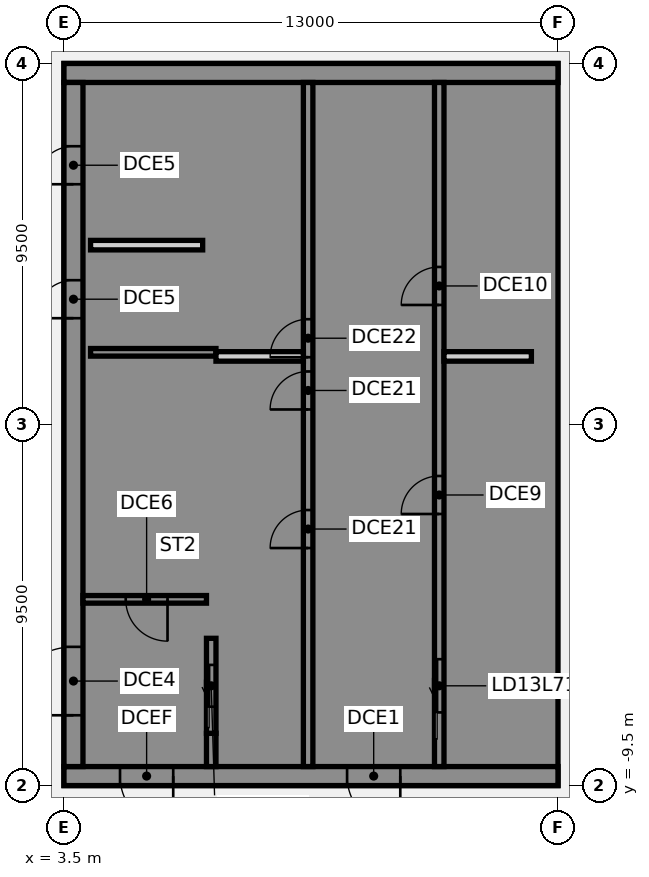
"""IFC4 building model, lengths in metres.
Left out: names, types, materials, properties, quantities, classifications, styles, units other than length and angle.
Written with IfcOpenShell. Run it as: python <this file> out.ifc"""

import sys

from ifc_helpers import new_model, si_unit, direction, frame, frame_2d, origin, place, context, subcontext, project, spatial, polyline, rectangle, outline, extrude, element, fill, save


model = new_model("IFC4")
c1 = context("Model", 3, precision=1e-05, world=origin(), true_north=direction((0.0, 1.0)))
c2 = subcontext(c1, "Body", "Model", "MODEL_VIEW")
j1 = project(units=[si_unit("LENGTHUNIT", "METRE"), si_unit("PLANEANGLEUNIT", "RADIAN")], contexts=[c1])
p1 = place(None, origin())
s1 = spatial("IfcSite", under=j1, at=p1, CompositionType="ELEMENT")
p2 = place(p1, origin())
s2 = spatial("IfcBuilding", under=s1, at=p2, CompositionType="ELEMENT")
p3 = place(p2, frame((0.0, 0.0, 278.4)))
s3 = spatial("IfcBuildingStorey", under=s2, at=p3, CompositionType="ELEMENT", Elevation=278.4)
p4 = place(p3, frame((16.5, -9.25, 0.0), z_axis=(0.0, 0.0, 1.0), x_axis=(-1.0, 0.0, 0.0)))
e1 = element("IfcWall", 1, at=p4, inside=s3, PredefinedType="SHEAR", context=c2, shape_type="SweptSolid", body=[
    extrude(rectangle(XDim=13.0, YDim=0.5, at=frame_2d((6.5, 0.0))), origin(), (0.0, 0.0, 1.0), 8.8),
])
p5 = place(p4, frame((4.15, 0.0, 0.0)))
e2 = element("IfcOpeningElement", 2, at=p5, cuts=e1, PredefinedType="OPENING", context=c2, shape_type="SweptSolid", body=[
    extrude(rectangle(XDim=1.4, YDim=2.1, at=frame_2d((0.7, 1.05))), frame((0.0, 0.26, 0.0), z_axis=(0.0, -1.0, 0.0), x_axis=(1.0, 0.0, 0.0)), (0.0, 0.0, 1.0), 0.52),
])
p6 = place(p4, frame((10.125, 0.0, 0.0)))
e3 = element("IfcOpeningElement", 3, at=p6, cuts=e1, PredefinedType="OPENING", context=c2, shape_type="SweptSolid", body=[
    extrude(rectangle(XDim=1.4, YDim=2.1, at=frame_2d((0.7, 1.05))), frame((0.0, 0.26, 0.0), z_axis=(0.0, -1.0, 0.0), x_axis=(1.0, 0.0, 0.0)), (0.0, 0.0, 1.0), 0.52),
])
p7 = place(p3, origin())
e4 = element("IfcWall", 4, at=p7, inside=s3, PredefinedType="SHEAR", context=c2, shape_type="SweptSolid", body=[
    extrude(outline(polyline([(13.5, -8.125), (13.5, -9.0), (16.0, -9.0), (16.5, -9.0), (16.5, 9.0), (16.0, 9.0), (13.5, 9.0), (13.5, 8.125), (16.0, 8.125), (16.0, 5.625), (13.5, 5.625), (13.5, 5.375), (16.0, 5.375), (16.0, -5.375), (13.5, -5.375), (13.5, -5.625), (16.0, -5.625), (16.0, -8.125), (13.5, -8.125)])), origin(), (0.0, 0.0, 1.0), 8.8),
])
p8 = place(p3, frame((16.5, 9.25, 0.0), z_axis=(0.0, 0.0, 1.0), x_axis=(-1.0, 0.0, 0.0)))
e5 = element("IfcWall", 5, at=p8, inside=s3, PredefinedType="SHEAR", context=c2, shape_type="SweptSolid", body=[
    extrude(rectangle(XDim=13.0, YDim=0.5, at=frame_2d((6.5, 0.0))), origin(), (0.0, 0.0, 1.0), 8.8),
])
p9 = place(p3, origin())
e6 = element("IfcWall", 6, at=p9, inside=s3, PredefinedType="SHEAR", context=c2, shape_type="SweptSolid", body=[
    extrude(outline(polyline([(9.8, -5.375), (7.5, -5.375), (7.5, 2.625), (9.8, 2.625), (9.8, 2.875), (7.5, 2.875), (7.5, 5.375), (9.8, 5.375), (9.8, 5.625), (7.5, 5.625), (7.5, 8.125), (9.8, 8.125), (9.8, 9.0), (7.5, 9.0), (7.25, 9.0), (7.25, -5.625), (7.5, -5.625), (9.8, -5.625), (9.8, -5.375)])), origin(), (0.0, 0.0, 1.0), 8.8),
])
p10 = place(p3, origin())
e7 = element("IfcWall", 7, at=p10, inside=s3, PredefinedType="SHEAR", context=c2, shape_type="SweptSolid", body=[
    extrude(outline(polyline([(7.5, -8.125), (7.5, -9.0), (9.8, -9.0), (9.8, -8.125), (9.8, -5.625), (9.55, -5.625), (9.55, -8.125), (7.5, -8.125)])), origin(), (0.0, 0.0, 1.0), 8.8),
])
p11 = place(p3, frame((7.375, -9.0, 0.0), z_axis=(0.0, 0.0, 1.0), x_axis=(0.0, 1.0, 0.0)))
e8 = element("IfcWall", 8, at=p11, inside=s3, PredefinedType="SHEAR", context=c2, shape_type="SweptSolid", body=[
    extrude(rectangle(XDim=0.875, YDim=0.25, at=frame_2d((0.438, 0.0))), origin(), (0.0, 0.0, 1.0), 8.8),
])
p12 = place(p3, frame((7.5, 1.9, 0.0), z_axis=(0.0, 0.0, 1.0), x_axis=(-1.0, 0.0, 0.0)))
e9 = element("IfcWall", 9, at=p12, inside=s3, PredefinedType="SHEAR", context=c2, shape_type="SweptSolid", body=[
    extrude(rectangle(XDim=3.3, YDim=0.2, at=frame_2d((1.65, 0.0))), origin(), (0.0, 0.0, 1.0), 8.8),
])
p13 = place(p3, frame((13.375, -9.0, 0.0), z_axis=(0.0, 0.0, 1.0), x_axis=(0.0, 1.0, 0.0)))
e10 = element("IfcWall", 10, at=p13, inside=s3, PredefinedType="SHEAR", context=c2, shape_type="SweptSolid", body=[
    extrude(rectangle(XDim=18.0, YDim=0.25, at=frame_2d((9.0, 0.0))), origin(), (0.0, 0.0, 1.0), 8.8),
])
p14 = place(p13, frame((1.425, 0.0, 0.0)))
e11 = element("IfcOpeningElement", 11, at=p14, cuts=e10, PredefinedType="OPENING", context=c2, shape_type="SweptSolid", body=[
    extrude(rectangle(XDim=1.4, YDim=2.1, at=frame_2d((0.7, 1.05))), frame((0.0, 0.135, 0.0), z_axis=(0.0, -1.0, 0.0), x_axis=(1.0, 0.0, 0.0)), (0.0, 0.0, 1.0), 0.27),
])
p15 = place(p13, frame((6.646, 0.0, 0.0)))
e12 = element("IfcOpeningElement", 12, at=p15, cuts=e10, PredefinedType="OPENING", context=c2, shape_type="SweptSolid", body=[
    extrude(rectangle(XDim=1.0, YDim=2.1, at=frame_2d((0.5, 1.05))), frame((0.0, 0.135, 0.0), z_axis=(0.0, -1.0, 0.0), x_axis=(1.0, 0.0, 0.0)), (0.0, 0.0, 1.0), 0.27),
])
p16 = place(p13, frame((12.146, 0.0, 0.0)))
e13 = element("IfcOpeningElement", 13, at=p16, cuts=e10, PredefinedType="OPENING", context=c2, shape_type="SweptSolid", body=[
    extrude(rectangle(XDim=1.0, YDim=2.1, at=frame_2d((0.5, 1.05))), frame((0.0, 0.135, 0.0), z_axis=(0.0, -1.0, 0.0), x_axis=(1.0, 0.0, 0.0)), (0.0, 0.0, 1.0), 0.27),
])
p17 = place(p3, frame((9.925, -9.0, 0.0), z_axis=(0.0, 0.0, 1.0), x_axis=(0.0, 1.0, 0.0)))
e14 = element("IfcWall", 14, at=p17, inside=s3, PredefinedType="SHEAR", context=c2, shape_type="SweptSolid", body=[
    extrude(rectangle(XDim=18.0, YDim=0.25, at=frame_2d((9.0, 0.0))), origin(), (0.0, 0.0, 1.0), 8.8),
])
p18 = place(p17, frame((5.75, 0.0, 0.0)))
e15 = element("IfcOpeningElement", 15, at=p18, cuts=e14, PredefinedType="OPENING", context=c2, shape_type="SweptSolid", body=[
    extrude(rectangle(XDim=1.0, YDim=2.1, at=frame_2d((0.5, 1.05))), frame((0.0, 0.135, 0.0), z_axis=(0.0, -1.0, 0.0), x_axis=(1.0, 0.0, 0.0)), (0.0, 0.0, 1.0), 0.27),
])
p19 = place(p17, frame((9.396, 0.0, 0.0)))
e16 = element("IfcOpeningElement", 16, at=p19, cuts=e14, PredefinedType="OPENING", context=c2, shape_type="SweptSolid", body=[
    extrude(rectangle(XDim=1.0, YDim=2.1, at=frame_2d((0.5, 1.05))), frame((0.0, 0.135, 0.0), z_axis=(0.0, -1.0, 0.0), x_axis=(1.0, 0.0, 0.0)), (0.0, 0.0, 1.0), 0.27),
])
p20 = place(p17, frame((10.771, 0.0, 0.0)))
e17 = element("IfcOpeningElement", 17, at=p20, cuts=e14, PredefinedType="OPENING", context=c2, shape_type="SweptSolid", body=[
    extrude(rectangle(XDim=1.0, YDim=2.1, at=frame_2d((0.5, 1.05))), frame((0.0, 0.135, 0.0), z_axis=(0.0, -1.0, 0.0), x_axis=(1.0, 0.0, 0.0)), (0.0, 0.0, 1.0), 0.27),
])
p21 = place(p3, frame((7.375, -8.125, 0.0), z_axis=(0.0, 0.0, 1.0), x_axis=(0.0, 1.0, 0.0)))
e18 = element("IfcWall", 18, at=p21, inside=s3, PredefinedType="SHEAR", context=c2, shape_type="SweptSolid", body=[
    extrude(rectangle(XDim=2.5, YDim=0.25, at=frame_2d((1.25, 0.0))), origin(), (0.0, 0.0, 1.0), 8.8),
])
p22 = place(p21, frame((0.7, 0.0, 0.0)))
e19 = element("IfcOpeningElement", 19, at=p22, cuts=e18, PredefinedType="OPENING", context=c2, shape_type="SweptSolid", body=[
    extrude(rectangle(XDim=1.1, YDim=2.1, at=frame_2d((0.55, 1.05))), frame((0.0, 0.135, 0.0), z_axis=(0.0, -1.0, 0.0), x_axis=(1.0, 0.0, 0.0)), (0.0, 0.0, 1.0), 0.27),
])
p23 = place(p3, frame((3.75, -9.0, 0.0), z_axis=(0.0, 0.0, 1.0), x_axis=(0.0, 1.0, 0.0)))
e20 = element("IfcWall", 20, at=p23, inside=s3, PredefinedType="SHEAR", context=c2, shape_type="SweptSolid", body=[
    extrude(rectangle(XDim=18.0, YDim=0.5, at=frame_2d((9.0, 0.0))), origin(), (0.0, 0.0, 1.0), 8.8),
])
p24 = place(p23, frame((1.35, 0.0, 0.0)))
e21 = element("IfcOpeningElement", 21, at=p24, cuts=e20, PredefinedType="OPENING", context=c2, shape_type="SweptSolid", body=[
    extrude(rectangle(XDim=1.8, YDim=2.1, at=frame_2d((0.9, 1.05))), frame((0.0, 0.26, 0.0), z_axis=(0.0, -1.0, 0.0), x_axis=(1.0, 0.0, 0.0)), (0.0, 0.0, 1.0), 0.52),
])
p25 = place(p23, frame((11.798, 0.0, 0.0)))
e22 = element("IfcOpeningElement", 22, at=p25, cuts=e20, PredefinedType="OPENING", context=c2, shape_type="SweptSolid", body=[
    extrude(rectangle(XDim=1.0, YDim=2.1, at=frame_2d((0.5, 1.05))), frame((0.0, 0.26, 0.0), z_axis=(0.0, -1.0, 0.0), x_axis=(1.0, 0.0, 0.0)), (0.0, 0.0, 1.0), 0.52),
])
p26 = place(p23, frame((15.323, 0.0, 0.0)))
e23 = element("IfcOpeningElement", 23, at=p26, cuts=e20, PredefinedType="OPENING", context=c2, shape_type="SweptSolid", body=[
    extrude(rectangle(XDim=1.0, YDim=2.1, at=frame_2d((0.5, 1.05))), frame((0.0, 0.26, 0.0), z_axis=(0.0, -1.0, 0.0), x_axis=(1.0, 0.0, 0.0)), (0.0, 0.0, 1.0), 0.52),
])
p27 = place(p3, frame((7.15, 4.72, 0.0), z_axis=(0.0, 0.0, 1.0), x_axis=(-1.0, 0.0, 0.0)))
e24 = element("IfcWall", 24, at=p27, inside=s3, PredefinedType="PARTITIONING", context=c2, shape_type="SweptSolid", body=[
    extrude(rectangle(XDim=2.95, YDim=0.25, at=frame_2d((1.475, 0.0))), origin(), (0.0, 0.0, 1.0), 8.8),
])
p28 = place(p3, frame((7.25, -4.6, 0.0), z_axis=(0.0, 0.0, 1.0), x_axis=(-1.0, 0.0, 0.0)))
e25 = element("IfcWall", 25, at=p28, inside=s3, PredefinedType="SHEAR", context=c2, shape_type="SweptSolid", body=[
    extrude(rectangle(XDim=3.25, YDim=0.2, at=frame_2d((1.625, 0.0))), origin(), (0.0, 0.0, 1.0), 8.8),
])
p29 = place(p28, frame((1.025, 0.0, 0.0)))
e26 = element("IfcOpeningElement", 26, at=p29, cuts=e25, PredefinedType="OPENING", context=c2, shape_type="SweptSolid", body=[
    extrude(rectangle(XDim=1.1, YDim=2.1, at=frame_2d((0.55, 1.05))), frame((0.0, 0.11, 0.0), z_axis=(0.0, -1.0, 0.0), x_axis=(1.0, 0.0, 0.0)), (0.0, 0.0, 1.0), 0.22),
])
for number, where, z_axis, x_axis in (
    (27, (15.8, 1.792, 0.0), (0.0, 0.0, 1.0), (-1.0, 0.0, 0.0)),
    (28, (9.8, 1.792, 0.0), (0.0, 0.0, 1.0), (-1.0, 0.0, 0.0)),
):
    element("IfcWall", number, at=place(p3, frame(where, z_axis=z_axis, x_axis=x_axis)), inside=s3, PredefinedType="PARTITIONING", context=c2, shape_type="SweptSolid", body=[
        extrude(rectangle(XDim=2.3, YDim=0.25, at=frame_2d((1.15, 0.0))), origin(), (0.0, 0.0, 1.0), 8.8),
    ])
p30 = place(p5, origin())
e29 = element("IfcDoor", 29, at=p30, inside=s3, OperationType="SINGLE_SWING_LEFT", PredefinedType="DOOR", context=c2, shape_type="SweptSolid", body=[
    extrude(rectangle(XDim=1.4, YDim=2.1, at=frame_2d((0.7, 1.05))), frame((0.0, 0.025, 0.0), z_axis=(0.0, -1.0, 0.0), x_axis=(1.0, 0.0, 0.0)), (0.0, 0.0, 1.0), 0.05),
])
fill(e2, e29)
p31 = place(p6, origin())
e30 = element("IfcDoor", 30, at=p31, inside=s3, OperationType="SINGLE_SWING_LEFT", PredefinedType="DOOR", context=c2, shape_type="SweptSolid", body=[
    extrude(rectangle(XDim=1.4, YDim=2.1, at=frame_2d((0.7, 1.05))), frame((0.0, 0.025, 0.0), z_axis=(0.0, -1.0, 0.0), x_axis=(1.0, 0.0, 0.0)), (0.0, 0.0, 1.0), 0.05),
])
fill(e3, e30)
p32 = place(p24, origin())
e31 = element("IfcDoor", 31, at=p32, inside=s3, OperationType="SINGLE_SWING_LEFT", PredefinedType="DOOR", context=c2, shape_type="SweptSolid", body=[
    extrude(rectangle(XDim=1.8, YDim=2.1, at=frame_2d((0.9, 1.05))), frame((0.0, 0.025, 0.0), z_axis=(0.0, -1.0, 0.0), x_axis=(1.0, 0.0, 0.0)), (0.0, 0.0, 1.0), 0.05),
])
fill(e21, e31)
p33 = place(p25, origin())
e32 = element("IfcDoor", 32, at=p33, inside=s3, OperationType="SINGLE_SWING_LEFT", PredefinedType="DOOR", context=c2, shape_type="SweptSolid", body=[
    extrude(rectangle(XDim=1.0, YDim=2.1, at=frame_2d((0.5, 1.05))), frame((0.0, -0.175, 0.0), z_axis=(0.0, -1.0, 0.0), x_axis=(1.0, 0.0, 0.0)), (0.0, 0.0, 1.0), 0.05),
])
fill(e22, e32)
p34 = place(p26, origin())
e33 = element("IfcDoor", 33, at=p34, inside=s3, OperationType="SINGLE_SWING_LEFT", PredefinedType="DOOR", context=c2, shape_type="SweptSolid", body=[
    extrude(rectangle(XDim=1.0, YDim=2.1, at=frame_2d((0.5, 1.05))), frame((0.0, -0.175, 0.0), z_axis=(0.0, -1.0, 0.0), x_axis=(1.0, 0.0, 0.0)), (0.0, 0.0, 1.0), 0.05),
])
fill(e23, e33)
p35 = place(p29, origin())
e34 = element("IfcDoor", 34, at=p35, inside=s3, OperationType="SINGLE_SWING_LEFT", PredefinedType="DOOR", context=c2, shape_type="SweptSolid", body=[
    extrude(rectangle(XDim=1.1, YDim=2.1, at=frame_2d((0.55, 1.05))), frame((0.0, 0.025, 0.0), z_axis=(0.0, -1.0, 0.0), x_axis=(1.0, 0.0, 0.0)), (0.0, 0.0, 1.0), 0.05),
])
fill(e26, e34)
p36 = place(p14, origin())
e35 = element("IfcDoor", 35, at=p36, inside=s3, OperationType="SLIDING_TO_LEFT", PredefinedType="DOOR", context=c2, shape_type="SweptSolid", body=[
    extrude(rectangle(XDim=1.4, YDim=2.1, at=frame_2d((0.7, 1.05))), frame((0.0, 0.025, 0.0), z_axis=(0.0, -1.0, 0.0), x_axis=(1.0, 0.0, 0.0)), (0.0, 0.0, 1.0), 0.05),
])
fill(e11, e35)
p37 = place(p22, origin())
e36 = element("IfcDoor", 36, at=p37, inside=s3, OperationType="SLIDING_TO_LEFT", PredefinedType="DOOR", context=c2, shape_type="SweptSolid", body=[
    extrude(rectangle(XDim=1.1, YDim=2.1, at=frame_2d((0.55, 1.05))), frame((0.0, 0.025, 0.0), z_axis=(0.0, -1.0, 0.0), x_axis=(1.0, 0.0, 0.0)), (0.0, 0.0, 1.0), 0.05),
])
fill(e19, e36)
p38 = place(p15, origin())
e37 = element("IfcDoor", 37, at=p38, inside=s3, OperationType="SINGLE_SWING_LEFT", PredefinedType="DOOR", context=c2, shape_type="SweptSolid", body=[
    extrude(rectangle(XDim=1.0, YDim=2.1, at=frame_2d((0.5, 1.05))), frame((0.0, 0.025, 0.0), z_axis=(0.0, -1.0, 0.0), x_axis=(1.0, 0.0, 0.0)), (0.0, 0.0, 1.0), 0.05),
])
fill(e12, e37)
p39 = place(p16, origin())
e38 = element("IfcDoor", 38, at=p39, inside=s3, OperationType="SINGLE_SWING_LEFT", PredefinedType="DOOR", context=c2, shape_type="SweptSolid", body=[
    extrude(rectangle(XDim=1.0, YDim=2.1, at=frame_2d((0.5, 1.05))), frame((0.0, 0.025, 0.0), z_axis=(0.0, -1.0, 0.0), x_axis=(1.0, 0.0, 0.0)), (0.0, 0.0, 1.0), 0.05),
])
fill(e13, e38)
p40 = place(p18, origin())
e39 = element("IfcDoor", 39, at=p40, inside=s3, OperationType="SINGLE_SWING_LEFT", PredefinedType="DOOR", context=c2, shape_type="SweptSolid", body=[
    extrude(rectangle(XDim=1.0, YDim=2.1, at=frame_2d((0.5, 1.05))), frame((0.0, 0.025, 0.0), z_axis=(0.0, -1.0, 0.0), x_axis=(1.0, 0.0, 0.0)), (0.0, 0.0, 1.0), 0.05),
])
fill(e15, e39)
p41 = place(p19, origin())
e40 = element("IfcDoor", 40, at=p41, inside=s3, OperationType="SINGLE_SWING_LEFT", PredefinedType="DOOR", context=c2, shape_type="SweptSolid", body=[
    extrude(rectangle(XDim=1.0, YDim=2.1, at=frame_2d((0.5, 1.05))), frame((0.0, 0.025, 0.0), z_axis=(0.0, -1.0, 0.0), x_axis=(1.0, 0.0, 0.0)), (0.0, 0.0, 1.0), 0.05),
])
fill(e16, e40)
p42 = place(p20, origin())
e41 = element("IfcDoor", 41, at=p42, inside=s3, OperationType="SINGLE_SWING_LEFT", PredefinedType="DOOR", context=c2, shape_type="SweptSolid", body=[
    extrude(rectangle(XDim=1.0, YDim=2.1, at=frame_2d((0.5, 1.05))), frame((0.0, 0.025, 0.0), z_axis=(0.0, -1.0, 0.0), x_axis=(1.0, 0.0, 0.0)), (0.0, 0.0, 1.0), 0.05),
])
fill(e17, e41)
save(model, sys.argv[1])
